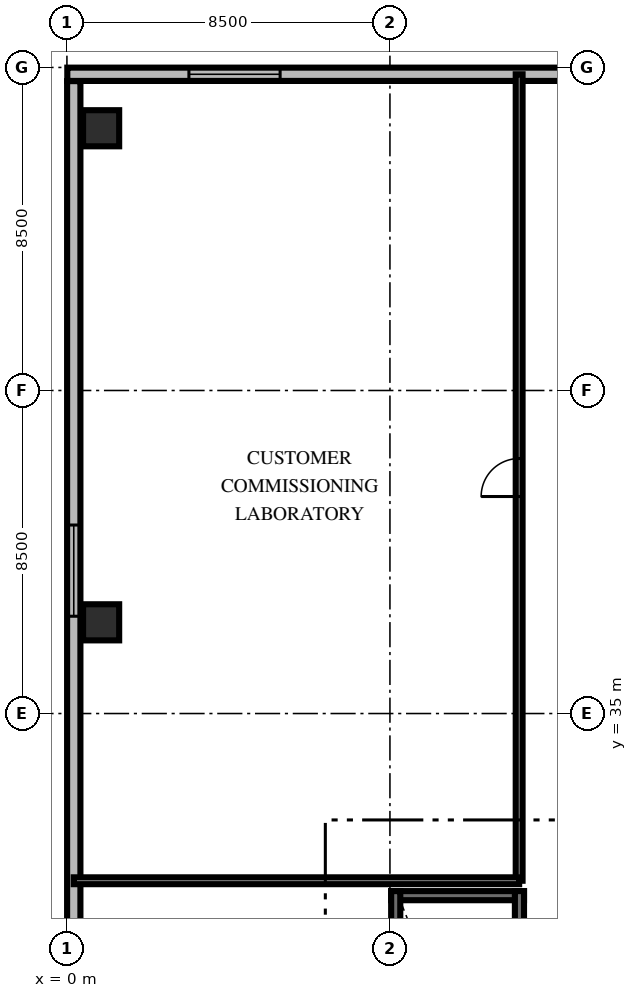
"""IFC4 building model, lengths in metres.
Left out: names, types, materials, properties, quantities, classifications, styles, units other than length and angle.
Written with IfcOpenShell. Run it as: python <this file> out.ifc"""

import sys

from ifc_helpers import new_model, si_unit, direction, frame, frame_2d, origin, origin_2d, place, context, subcontext, project, spatial, rectangle, extrude, element, fill, save


model = new_model("IFC4")
c1 = context("Model", 3, precision=1e-05, world=origin(), true_north=direction((0.0, 1.0)))
c2 = subcontext(c1, "Body", "Model", "MODEL_VIEW")
j1 = project(units=[si_unit("LENGTHUNIT", "METRE"), si_unit("PLANEANGLEUNIT", "RADIAN")], contexts=[c1])
p1 = place(None, origin())
s1 = spatial("IfcSite", under=j1, at=p1, CompositionType="ELEMENT")
p2 = place(p1, origin())
s2 = spatial("IfcBuilding", under=s1, at=p2, CompositionType="ELEMENT")
p3 = place(p2, frame((0.0, 0.0, 25.2)))
s3 = spatial("IfcBuildingStorey", under=s2, at=p3, CompositionType="ELEMENT", Elevation=25.2)
p4 = place(p3, frame((8.532, 30.208, 0.0), z_axis=(0.0, 0.0, 1.0), x_axis=(1.0, 0.0, 0.0)))
e1 = element("IfcWall", 1, at=p4, inside=s3, PredefinedType="SHEAR", context=c2, shape_type="SweptSolid", body=[
    extrude(rectangle(XDim=3.496, YDim=0.24, at=frame_2d((1.748, 0.0))), origin(), (0.0, 0.0, 1.0), 4.8),
])
p5 = place(p3, frame((8.652, 20.772, 0.0), z_axis=(0.0, 0.0, 1.0), x_axis=(0.0, 1.0, 0.0)))
e2 = element("IfcWall", 2, at=p5, inside=s3, PredefinedType="SHEAR", context=c2, shape_type="SweptSolid", body=[
    extrude(rectangle(XDim=9.556, YDim=0.24, at=frame_2d((4.778, 0.0))), origin(), (0.0, 0.0, 1.0), 4.8),
])
p6 = place(p3, frame((11.908, 20.772, 0.0), z_axis=(0.0, 0.0, 1.0), x_axis=(0.0, 1.0, 0.0)))
e3 = element("IfcWall", 3, at=p6, inside=s3, PredefinedType="SHEAR", context=c2, shape_type="SweptSolid", body=[
    extrude(rectangle(XDim=9.556, YDim=0.24, at=frame_2d((4.778, 0.0))), origin(), (0.0, 0.0, 1.0), 4.8),
])
p7 = place(p6, frame((0.55, 0.0, 0.0)))
e4 = element("IfcOpeningElement", 4, at=p7, cuts=e3, PredefinedType="OPENING", context=c2, shape_type="SweptSolid", body=[
    extrude(rectangle(XDim=1.05, YDim=2.15, at=frame_2d((0.525, 1.075))), frame((0.0, 0.13, 0.0), z_axis=(0.0, -1.0, 0.0), x_axis=(1.0, 0.0, 0.0)), (0.0, 0.0, 1.0), 0.26),
])
for number, where, z_axis, x_axis in (
    (5, (0.9, 37.4, 0.0), (0.0, 0.0, 1.0), (1.0, 0.0, 0.0)),
    (6, (0.9, 50.4, 0.0), (0.0, 0.0, 1.0), (1.0, 0.0, 0.0)),
):
    element("IfcColumn", number, at=place(p3, frame(where, z_axis=z_axis, x_axis=x_axis)), inside=s3, PredefinedType="COLUMN", context=c2, shape_type="SweptSolid", body=[
        extrude(rectangle(XDim=0.95, YDim=0.95, at=origin_2d()), origin(), (0.0, 0.0, 1.0), 4.8),
    ])
p8 = place(p3, frame((0.18, 0.36, 0.0), z_axis=(0.0, 0.0, 1.0), x_axis=(0.0, 1.0, 0.0)))
e7 = element("IfcWall", 7, at=p8, inside=s3, PredefinedType="SOLIDWALL", context=c2, shape_type="SweptSolid", body=[
    extrude(rectangle(XDim=51.28, YDim=0.35, at=frame_2d((25.64, 0.0))), origin(), (0.0, 0.0, 1.0), 3.8),
])
p9 = place(p8, frame((3.2, 0.0, 0.85)))
e8 = element("IfcOpeningElement", 8, at=p9, cuts=e7, PredefinedType="OPENING", context=c2, shape_type="SweptSolid", body=[
    extrude(rectangle(XDim=2.4, YDim=2.4, at=frame_2d((1.2, 1.2))), frame((0.0, 0.185, 0.0), z_axis=(0.0, -1.0, 0.0), x_axis=(1.0, 0.0, 0.0)), (0.0, 0.0, 1.0), 0.37),
])
p10 = place(p8, frame((11.7, 0.0, 0.85)))
e9 = element("IfcOpeningElement", 9, at=p10, cuts=e7, PredefinedType="OPENING", context=c2, shape_type="SweptSolid", body=[
    extrude(rectangle(XDim=2.4, YDim=2.4, at=frame_2d((1.2, 1.2))), frame((0.0, 0.185, 0.0), z_axis=(0.0, -1.0, 0.0), x_axis=(1.0, 0.0, 0.0)), (0.0, 0.0, 1.0), 0.37),
])
p11 = place(p8, frame((22.05, 0.0, 0.85)))
e10 = element("IfcOpeningElement", 10, at=p11, cuts=e7, PredefinedType="OPENING", context=c2, shape_type="SweptSolid", body=[
    extrude(rectangle(XDim=2.4, YDim=2.4, at=frame_2d((1.2, 1.2))), frame((0.0, 0.185, 0.0), z_axis=(0.0, -1.0, 0.0), x_axis=(1.0, 0.0, 0.0)), (0.0, 0.0, 1.0), 0.37),
])
p12 = place(p8, frame((37.2, 0.0, 0.85)))
e11 = element("IfcOpeningElement", 11, at=p12, cuts=e7, PredefinedType="OPENING", context=c2, shape_type="SweptSolid", body=[
    extrude(rectangle(XDim=2.4, YDim=2.4, at=frame_2d((1.2, 1.2))), frame((0.0, 0.185, 0.0), z_axis=(0.0, -1.0, 0.0), x_axis=(1.0, 0.0, 0.0)), (0.0, 0.0, 1.0), 0.37),
])
p13 = place(p3, frame((0.01, 51.82, 0.0), z_axis=(0.0, 0.0, 1.0), x_axis=(1.0, 0.0, 0.0)))
e12 = element("IfcWall", 12, at=p13, inside=s3, PredefinedType="SOLIDWALL", context=c2, shape_type="SweptSolid", body=[
    extrude(rectangle(XDim=25.42, YDim=0.35, at=frame_2d((12.71, 0.0))), origin(), (0.0, 0.0, 1.0), 3.8),
])
p14 = place(p13, frame((3.2, 0.0, 0.85)))
e13 = element("IfcOpeningElement", 13, at=p14, cuts=e12, PredefinedType="OPENING", context=c2, shape_type="SweptSolid", body=[
    extrude(rectangle(XDim=2.4, YDim=2.4, at=frame_2d((1.2, 1.2))), frame((0.0, 0.185, 0.0), z_axis=(0.0, -1.0, 0.0), x_axis=(1.0, 0.0, 0.0)), (0.0, 0.0, 1.0), 0.37),
])
p15 = place(p3, frame((11.9, 30.6, 0.0), z_axis=(0.0, 0.0, 1.0), x_axis=(0.0, 1.0, 0.0)))
e14 = element("IfcWall", 14, at=p15, inside=s3, PredefinedType="PARTITIONING", context=c2, shape_type="SweptSolid", body=[
    extrude(rectangle(XDim=21.22, YDim=0.18, at=frame_2d((10.61, 0.0))), origin(), (0.0, 0.0, 1.0), 3.6),
])
p16 = place(p15, frame((10.11, 0.0, 0.0)))
e15 = element("IfcOpeningElement", 15, at=p16, cuts=e14, PredefinedType="OPENING", context=c2, shape_type="SweptSolid", body=[
    extrude(rectangle(XDim=1.0, YDim=2.15, at=frame_2d((0.5, 1.075))), frame((0.0, 0.1, 0.0), z_axis=(0.0, -1.0, 0.0), x_axis=(1.0, 0.0, 0.0)), (0.0, 0.0, 1.0), 0.2),
])
p17 = place(p3, frame((0.18, 30.6, 0.0), z_axis=(0.0, 0.0, 1.0), x_axis=(1.0, 0.0, 0.0)))
e16 = element("IfcWall", 16, at=p17, inside=s3, PredefinedType="PARTITIONING", context=c2, shape_type="SweptSolid", body=[
    extrude(rectangle(XDim=11.72, YDim=0.18, at=frame_2d((5.86, 0.0))), origin(), (0.0, 0.0, 1.0), 3.6),
])
p18 = place(p12, origin())
e17 = element("IfcWindow", 17, at=p18, inside=s3, PartitioningType="SINGLE_PANEL", PredefinedType="WINDOW", context=c2, shape_type="SweptSolid", body=[
    extrude(rectangle(XDim=2.4, YDim=2.4, at=frame_2d((1.2, 1.2))), frame((0.0, 0.03, 0.0), z_axis=(0.0, -1.0, 0.0), x_axis=(1.0, 0.0, 0.0)), (0.0, 0.0, 1.0), 0.06),
])
fill(e11, e17)
p19 = place(p14, origin())
e18 = element("IfcWindow", 18, at=p19, inside=s3, PartitioningType="SINGLE_PANEL", PredefinedType="WINDOW", context=c2, shape_type="SweptSolid", body=[
    extrude(rectangle(XDim=2.4, YDim=2.4, at=frame_2d((1.2, 1.2))), frame((0.0, 0.03, 0.0), z_axis=(0.0, -1.0, 0.0), x_axis=(1.0, 0.0, 0.0)), (0.0, 0.0, 1.0), 0.06),
])
fill(e13, e18)
p20 = place(p16, origin())
e19 = element("IfcDoor", 19, at=p20, inside=s3, OperationType="SINGLE_SWING_LEFT", PredefinedType="DOOR", context=c2, shape_type="SweptSolid", body=[
    extrude(rectangle(XDim=1.0, YDim=2.15, at=frame_2d((0.5, 1.075))), frame((0.0, 0.025, 0.0), z_axis=(0.0, -1.0, 0.0), x_axis=(1.0, 0.0, 0.0)), (0.0, 0.0, 1.0), 0.05),
])
fill(e15, e19)
save(model, sys.argv[1])
